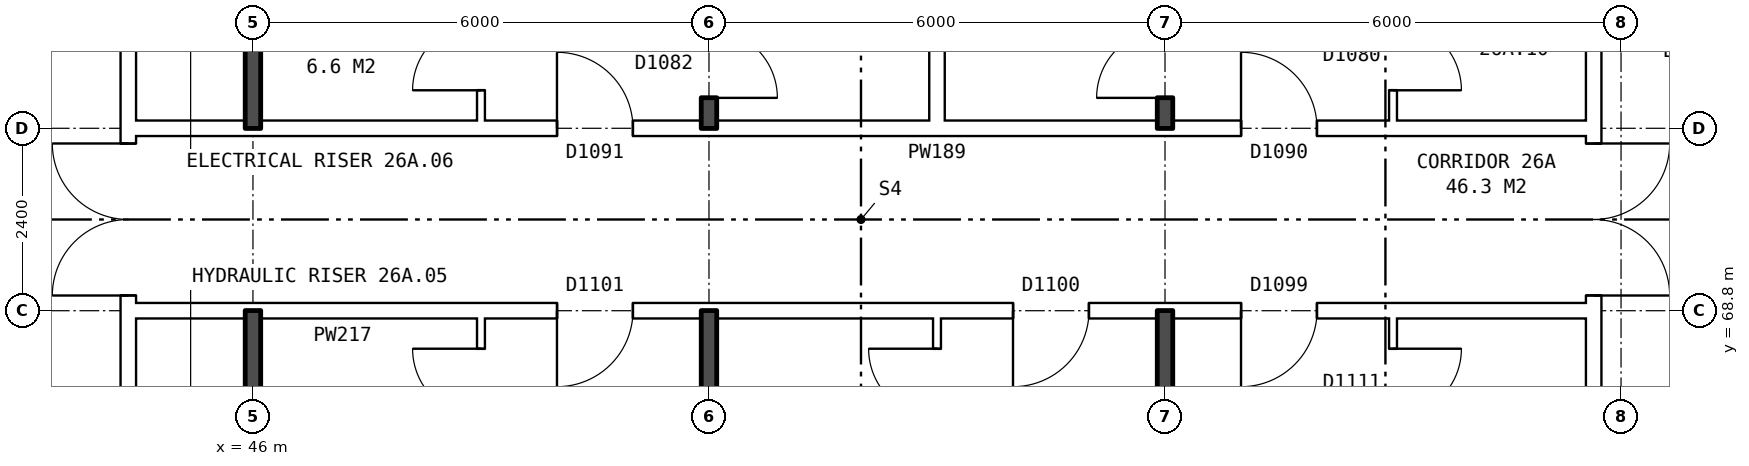
"""IFC4 building model, lengths in metres.
Left out: names, types, materials, properties, quantities, classifications, styles, units other than length and angle.
Written with IfcOpenShell. Run it as: python <this file> out.ifc"""

import sys

from ifc_helpers import new_model, si_unit, direction, frame, frame_2d, origin, place, context, subcontext, project, spatial, rectangle, extrude, element, fill, save


model = new_model("IFC4")
c1 = context("Model", 3, precision=1e-05, world=origin(), true_north=direction((0.0, 1.0)))
c2 = subcontext(c1, "Body", "Model", "MODEL_VIEW")
j1 = project(units=[si_unit("LENGTHUNIT", "METRE"), si_unit("PLANEANGLEUNIT", "RADIAN")], contexts=[c1])
p1 = place(None, origin())
s1 = spatial("IfcSite", under=j1, at=p1, CompositionType="ELEMENT")
p2 = place(p1, origin())
s2 = spatial("IfcBuilding", under=s1, at=p2, CompositionType="ELEMENT")
p3 = place(p2, frame((0.0, 0.0, 96.4)))
s3 = spatial("IfcBuildingStorey", under=s2, at=p3, CompositionType="ELEMENT", Elevation=96.4)
p4 = place(p3, frame((63.64, 63.9, 0.0), z_axis=(0.0, 0.0, 1.0), x_axis=(0.0, 1.0, 0.0)))
e1 = element("IfcWall", 1, at=p4, inside=s3, PredefinedType="PARTITIONING", context=c2, shape_type="SweptSolid", body=[
    extrude(rectangle(XDim=12.2, YDim=0.2, at=frame_2d((6.1, 0.0))), origin(), (0.0, 0.0, 1.0), 2.85),
])
p5 = place(p4, frame((5.1, 0.0, 0.0)))
e2 = element("IfcOpeningElement", 2, at=p5, cuts=e1, PredefinedType="OPENING", context=c2, shape_type="SweptSolid", body=[
    extrude(rectangle(XDim=2.0, YDim=2.1, at=frame_2d((1.0, 1.05))), frame((0.0, 0.11, 0.0), z_axis=(0.0, -1.0, 0.0), x_axis=(1.0, 0.0, 0.0)), (0.0, 0.0, 1.0), 0.22),
])
p6 = place(p3, frame((44.36, 63.9, 0.0), z_axis=(0.0, 0.0, 1.0), x_axis=(0.0, 1.0, 0.0)))
e3 = element("IfcWall", 3, at=p6, inside=s3, PredefinedType="PARTITIONING", context=c2, shape_type="SweptSolid", body=[
    extrude(rectangle(XDim=12.2, YDim=0.2, at=frame_2d((6.1, 0.0))), origin(), (0.0, 0.0, 1.0), 2.85),
])
p7 = place(p6, frame((5.1, 0.0, 0.0)))
e4 = element("IfcOpeningElement", 4, at=p7, cuts=e3, PredefinedType="OPENING", context=c2, shape_type="SweptSolid", body=[
    extrude(rectangle(XDim=2.0, YDim=2.1, at=frame_2d((1.0, 1.05))), frame((0.0, 0.11, 0.0), z_axis=(0.0, -1.0, 0.0), x_axis=(1.0, 0.0, 0.0)), (0.0, 0.0, 1.0), 0.22),
])
p8 = place(p3, frame((44.36, 68.8, 0.0), z_axis=(0.0, 0.0, 1.0), x_axis=(1.0, 0.0, 0.0)))
e5 = element("IfcWall", 5, at=p8, inside=s3, PredefinedType="PARTITIONING", context=c2, shape_type="SweptSolid", body=[
    extrude(rectangle(XDim=19.28, YDim=0.2, at=frame_2d((9.64, 0.0))), origin(), (0.0, 0.0, 1.0), 2.85),
])
p9 = place(p8, frame((14.64, 0.0, 0.0)))
e6 = element("IfcOpeningElement", 6, at=p9, cuts=e5, PredefinedType="OPENING", context=c2, shape_type="SweptSolid", body=[
    extrude(rectangle(XDim=1.0, YDim=2.1, at=frame_2d((0.5, 1.05))), frame((0.0, 0.11, 0.0), z_axis=(0.0, -1.0, 0.0), x_axis=(1.0, 0.0, 0.0)), (0.0, 0.0, 1.0), 0.22),
])
p10 = place(p8, frame((11.64, 0.0, 0.0)))
e7 = element("IfcOpeningElement", 7, at=p10, cuts=e5, PredefinedType="OPENING", context=c2, shape_type="SweptSolid", body=[
    extrude(rectangle(XDim=1.0, YDim=2.1, at=frame_2d((0.5, 1.05))), frame((0.0, 0.11, 0.0), z_axis=(0.0, -1.0, 0.0), x_axis=(1.0, 0.0, 0.0)), (0.0, 0.0, 1.0), 0.22),
])
p11 = place(p8, frame((5.64, 0.0, 0.0)))
e8 = element("IfcOpeningElement", 8, at=p11, cuts=e5, PredefinedType="OPENING", context=c2, shape_type="SweptSolid", body=[
    extrude(rectangle(XDim=1.0, YDim=2.1, at=frame_2d((0.5, 1.05))), frame((0.0, 0.11, 0.0), z_axis=(0.0, -1.0, 0.0), x_axis=(1.0, 0.0, 0.0)), (0.0, 0.0, 1.0), 0.22),
])
p12 = place(p3, frame((44.36, 71.2, 0.0), z_axis=(0.0, 0.0, 1.0), x_axis=(1.0, 0.0, 0.0)))
e9 = element("IfcWall", 9, at=p12, inside=s3, PredefinedType="PARTITIONING", context=c2, shape_type="SweptSolid", body=[
    extrude(rectangle(XDim=19.28, YDim=0.2, at=frame_2d((9.64, 0.0))), origin(), (0.0, 0.0, 1.0), 2.85),
])
p13 = place(p12, frame((14.64, 0.0, 0.0)))
e10 = element("IfcOpeningElement", 10, at=p13, cuts=e9, PredefinedType="OPENING", context=c2, shape_type="SweptSolid", body=[
    extrude(rectangle(XDim=1.0, YDim=2.1, at=frame_2d((0.5, 1.05))), frame((0.0, 0.11, 0.0), z_axis=(0.0, -1.0, 0.0), x_axis=(1.0, 0.0, 0.0)), (0.0, 0.0, 1.0), 0.22),
])
p14 = place(p12, frame((5.64, 0.0, 0.0)))
e11 = element("IfcOpeningElement", 11, at=p14, cuts=e9, PredefinedType="OPENING", context=c2, shape_type="SweptSolid", body=[
    extrude(rectangle(XDim=1.0, YDim=2.1, at=frame_2d((0.5, 1.05))), frame((0.0, 0.11, 0.0), z_axis=(0.0, -1.0, 0.0), x_axis=(1.0, 0.0, 0.0)), (0.0, 0.0, 1.0), 0.22),
])
for number, where, z_axis, x_axis in (
    (12, (46.0, 63.8, 0.0), (0.0, 0.0, 1.0), (0.0, 1.0, 0.0)),
    (13, (46.0, 71.2, 0.0), (0.0, 0.0, 1.0), (0.0, 1.0, 0.0)),
):
    element("IfcWall", number, at=place(p3, frame(where, z_axis=z_axis, x_axis=x_axis)), inside=s3, PredefinedType="SOLIDWALL", context=c2, shape_type="SweptSolid", body=[
        extrude(rectangle(XDim=5.0, YDim=0.2, at=frame_2d((2.5, 0.0))), origin(), (0.0, 0.0, 1.0), 2.85),
    ])
p15 = place(p3, frame((49.0, 54.36, 0.0), z_axis=(0.0, 0.0, 1.0), x_axis=(0.0, 1.0, 0.0)))
e14 = element("IfcWall", 14, at=p15, inside=s3, PredefinedType="PARTITIONING", context=c2, shape_type="SweptSolid", body=[
    extrude(rectangle(XDim=14.34, YDim=0.1, at=frame_2d((7.17, 0.0))), origin(), (0.0, 0.0, 1.0), 2.85),
])
p16 = place(p15, frame((7.7, 0.0, 0.0)))
e15 = element("IfcOpeningElement", 15, at=p16, cuts=e14, PredefinedType="OPENING", context=c2, shape_type="SweptSolid", body=[
    extrude(rectangle(XDim=0.9, YDim=2.1, at=frame_2d((0.45, 1.05))), frame((0.0, 0.06, 0.0), z_axis=(0.0, -1.0, 0.0), x_axis=(1.0, 0.0, 0.0)), (0.0, 0.0, 1.0), 0.12),
])
p17 = place(p15, frame((13.04, 0.0, 0.0)))
e16 = element("IfcOpeningElement", 16, at=p17, cuts=e14, PredefinedType="OPENING", context=c2, shape_type="SweptSolid", body=[
    extrude(rectangle(XDim=0.9, YDim=2.1, at=frame_2d((0.45, 1.05))), frame((0.0, 0.06, 0.0), z_axis=(0.0, -1.0, 0.0), x_axis=(1.0, 0.0, 0.0)), (0.0, 0.0, 1.0), 0.12),
])
p18 = place(p3, frame((49.0, 71.3, 0.0), z_axis=(0.0, 0.0, 1.0), x_axis=(0.0, 1.0, 0.0)))
e17 = element("IfcWall", 17, at=p18, inside=s3, PredefinedType="PARTITIONING", context=c2, shape_type="SweptSolid", body=[
    extrude(rectangle(XDim=14.34, YDim=0.1, at=frame_2d((7.17, 0.0))), origin(), (0.0, 0.0, 1.0), 2.85),
])
p19 = place(p18, frame((7.94, 0.0, 0.0)))
e18 = element("IfcOpeningElement", 18, at=p19, cuts=e17, PredefinedType="OPENING", context=c2, shape_type="SweptSolid", body=[
    extrude(rectangle(XDim=0.9, YDim=2.1, at=frame_2d((0.45, 1.05))), frame((0.0, 0.06, 0.0), z_axis=(0.0, -1.0, 0.0), x_axis=(1.0, 0.0, 0.0)), (0.0, 0.0, 1.0), 0.12),
])
p20 = place(p18, frame((0.4, 0.0, 0.0)))
e19 = element("IfcOpeningElement", 19, at=p20, cuts=e17, PredefinedType="OPENING", context=c2, shape_type="SweptSolid", body=[
    extrude(rectangle(XDim=0.9, YDim=2.1, at=frame_2d((0.45, 1.05))), frame((0.0, 0.06, 0.0), z_axis=(0.0, -1.0, 0.0), x_axis=(1.0, 0.0, 0.0)), (0.0, 0.0, 1.0), 0.12),
])
p21 = place(p3, frame((52.0, 54.36, 0.0), z_axis=(0.0, 0.0, 1.0), x_axis=(0.0, 1.0, 0.0)))
e20 = element("IfcWall", 20, at=p21, inside=s3, PredefinedType="SOLIDWALL", context=c2, shape_type="SweptSolid", body=[
    extrude(rectangle(XDim=14.44, YDim=0.2, at=frame_2d((7.22, 0.0))), origin(), (0.0, 0.0, 1.0), 2.85),
])
p22 = place(p3, frame((52.0, 71.2, 0.0), z_axis=(0.0, 0.0, 1.0), x_axis=(0.0, 1.0, 0.0)))
e21 = element("IfcWall", 21, at=p22, inside=s3, PredefinedType="SOLIDWALL", context=c2, shape_type="SweptSolid", body=[
    extrude(rectangle(XDim=14.44, YDim=0.2, at=frame_2d((7.22, 0.0))), origin(), (0.0, 0.0, 1.0), 2.85),
])
p23 = place(p22, frame((8.04, 0.0, 0.0)))
e22 = element("IfcOpeningElement", 22, at=p23, cuts=e21, PredefinedType="OPENING", context=c2, shape_type="SweptSolid", body=[
    extrude(rectangle(XDim=0.9, YDim=2.1, at=frame_2d((0.45, 1.05))), frame((0.0, 0.11, 0.0), z_axis=(0.0, -1.0, 0.0), x_axis=(1.0, 0.0, 0.0)), (0.0, 0.0, 1.0), 0.22),
])
p24 = place(p22, frame((0.4, 0.0, 0.0)))
e23 = element("IfcOpeningElement", 23, at=p24, cuts=e21, PredefinedType="OPENING", context=c2, shape_type="SweptSolid", body=[
    extrude(rectangle(XDim=0.9, YDim=2.1, at=frame_2d((0.45, 1.05))), frame((0.0, 0.11, 0.0), z_axis=(0.0, -1.0, 0.0), x_axis=(1.0, 0.0, 0.0)), (0.0, 0.0, 1.0), 0.22),
])
p25 = place(p3, frame((55.0, 54.36, 0.0), z_axis=(0.0, 0.0, 1.0), x_axis=(0.0, 1.0, 0.0)))
e24 = element("IfcWall", 24, at=p25, inside=s3, PredefinedType="PARTITIONING", context=c2, shape_type="SweptSolid", body=[
    extrude(rectangle(XDim=14.34, YDim=0.1, at=frame_2d((7.17, 0.0))), origin(), (0.0, 0.0, 1.0), 2.85),
])
p26 = place(p25, frame((4.2, 0.0, 0.0)))
e25 = element("IfcOpeningElement", 25, at=p26, cuts=e24, PredefinedType="OPENING", context=c2, shape_type="SweptSolid", body=[
    extrude(rectangle(XDim=0.9, YDim=2.1, at=frame_2d((0.45, 1.05))), frame((0.0, 0.06, 0.0), z_axis=(0.0, -1.0, 0.0), x_axis=(1.0, 0.0, 0.0)), (0.0, 0.0, 1.0), 0.12),
])
p27 = place(p25, frame((13.04, 0.0, 0.0)))
e26 = element("IfcOpeningElement", 26, at=p27, cuts=e24, PredefinedType="OPENING", context=c2, shape_type="SweptSolid", body=[
    extrude(rectangle(XDim=0.9, YDim=2.1, at=frame_2d((0.45, 1.05))), frame((0.0, 0.06, 0.0), z_axis=(0.0, -1.0, 0.0), x_axis=(1.0, 0.0, 0.0)), (0.0, 0.0, 1.0), 0.12),
])
p28 = place(p3, frame((55.0, 71.3, 0.0), z_axis=(0.0, 0.0, 1.0), x_axis=(0.0, 1.0, 0.0)))
e27 = element("IfcWall", 27, at=p28, inside=s3, PredefinedType="PARTITIONING", context=c2, shape_type="SweptSolid", body=[
    extrude(rectangle(XDim=14.34, YDim=0.2, at=frame_2d((7.17, 0.0))), origin(), (0.0, 0.0, 1.0), 2.85),
])
p29 = place(p3, frame((58.0, 54.36, 0.0), z_axis=(0.0, 0.0, 1.0), x_axis=(0.0, 1.0, 0.0)))
e28 = element("IfcWall", 28, at=p29, inside=s3, PredefinedType="SOLIDWALL", context=c2, shape_type="SweptSolid", body=[
    extrude(rectangle(XDim=14.44, YDim=0.2, at=frame_2d((7.22, 0.0))), origin(), (0.0, 0.0, 1.0), 2.85),
])
p30 = place(p3, frame((58.0, 71.2, 0.0), z_axis=(0.0, 0.0, 1.0), x_axis=(0.0, 1.0, 0.0)))
e29 = element("IfcWall", 29, at=p30, inside=s3, PredefinedType="SOLIDWALL", context=c2, shape_type="SweptSolid", body=[
    extrude(rectangle(XDim=14.44, YDim=0.2, at=frame_2d((7.22, 0.0))), origin(), (0.0, 0.0, 1.0), 2.85),
])
p31 = place(p30, frame((9.34, 0.0, 0.0)))
e30 = element("IfcOpeningElement", 30, at=p31, cuts=e29, PredefinedType="OPENING", context=c2, shape_type="SweptSolid", body=[
    extrude(rectangle(XDim=0.9, YDim=2.1, at=frame_2d((0.45, 1.05))), frame((0.0, 0.11, 0.0), z_axis=(0.0, -1.0, 0.0), x_axis=(1.0, 0.0, 0.0)), (0.0, 0.0, 1.0), 0.22),
])
p32 = place(p30, frame((0.4, 0.0, 0.0)))
e31 = element("IfcOpeningElement", 31, at=p32, cuts=e29, PredefinedType="OPENING", context=c2, shape_type="SweptSolid", body=[
    extrude(rectangle(XDim=0.9, YDim=2.1, at=frame_2d((0.45, 1.05))), frame((0.0, 0.11, 0.0), z_axis=(0.0, -1.0, 0.0), x_axis=(1.0, 0.0, 0.0)), (0.0, 0.0, 1.0), 0.22),
])
p33 = place(p3, frame((61.0, 54.36, 0.0), z_axis=(0.0, 0.0, 1.0), x_axis=(0.0, 1.0, 0.0)))
e32 = element("IfcWall", 32, at=p33, inside=s3, PredefinedType="PARTITIONING", context=c2, shape_type="SweptSolid", body=[
    extrude(rectangle(XDim=14.34, YDim=0.1, at=frame_2d((7.17, 0.0))), origin(), (0.0, 0.0, 1.0), 2.85),
])
p34 = place(p33, frame((4.2, 0.0, 0.0)))
e33 = element("IfcOpeningElement", 33, at=p34, cuts=e32, PredefinedType="OPENING", context=c2, shape_type="SweptSolid", body=[
    extrude(rectangle(XDim=0.9, YDim=2.1, at=frame_2d((0.45, 1.05))), frame((0.0, 0.06, 0.0), z_axis=(0.0, -1.0, 0.0), x_axis=(1.0, 0.0, 0.0)), (0.0, 0.0, 1.0), 0.12),
])
p35 = place(p33, frame((13.04, 0.0, 0.0)))
e34 = element("IfcOpeningElement", 34, at=p35, cuts=e32, PredefinedType="OPENING", context=c2, shape_type="SweptSolid", body=[
    extrude(rectangle(XDim=0.9, YDim=2.1, at=frame_2d((0.45, 1.05))), frame((0.0, 0.06, 0.0), z_axis=(0.0, -1.0, 0.0), x_axis=(1.0, 0.0, 0.0)), (0.0, 0.0, 1.0), 0.12),
])
p36 = place(p3, frame((61.0, 71.3, 0.0), z_axis=(0.0, 0.0, 1.0), x_axis=(0.0, 1.0, 0.0)))
e35 = element("IfcWall", 35, at=p36, inside=s3, PredefinedType="PARTITIONING", context=c2, shape_type="SweptSolid", body=[
    extrude(rectangle(XDim=14.34, YDim=0.1, at=frame_2d((7.17, 0.0))), origin(), (0.0, 0.0, 1.0), 2.85),
])
p37 = place(p36, frame((9.24, 0.0, 0.0)))
e36 = element("IfcOpeningElement", 36, at=p37, cuts=e35, PredefinedType="OPENING", context=c2, shape_type="SweptSolid", body=[
    extrude(rectangle(XDim=0.9, YDim=2.1, at=frame_2d((0.45, 1.05))), frame((0.0, 0.06, 0.0), z_axis=(0.0, -1.0, 0.0), x_axis=(1.0, 0.0, 0.0)), (0.0, 0.0, 1.0), 0.12),
])
p38 = place(p36, frame((0.4, 0.0, 0.0)))
e37 = element("IfcOpeningElement", 37, at=p38, cuts=e35, PredefinedType="OPENING", context=c2, shape_type="SweptSolid", body=[
    extrude(rectangle(XDim=0.9, YDim=2.1, at=frame_2d((0.45, 1.05))), frame((0.0, 0.06, 0.0), z_axis=(0.0, -1.0, 0.0), x_axis=(1.0, 0.0, 0.0)), (0.0, 0.0, 1.0), 0.12),
])
p39 = place(p5, frame((2.0, 0.0, 0.0), z_axis=(0.0, 0.0, 1.0), x_axis=(-1.0, 0.0, 0.0)))
e38 = element("IfcDoor", 38, at=p39, inside=s3, OperationType="DOUBLE_DOOR_SINGLE_SWING", PredefinedType="DOOR", context=c2, shape_type="SweptSolid", body=[
    extrude(rectangle(XDim=2.0, YDim=2.1, at=frame_2d((1.0, 1.05))), frame((0.0, 0.025, 0.0), z_axis=(0.0, -1.0, 0.0), x_axis=(1.0, 0.0, 0.0)), (0.0, 0.0, 1.0), 0.05),
])
fill(e2, e38)
p40 = place(p7, origin())
e39 = element("IfcDoor", 39, at=p40, inside=s3, OperationType="DOUBLE_DOOR_SINGLE_SWING", PredefinedType="DOOR", context=c2, shape_type="SweptSolid", body=[
    extrude(rectangle(XDim=2.0, YDim=2.1, at=frame_2d((1.0, 1.05))), frame((0.0, 0.025, 0.0), z_axis=(0.0, -1.0, 0.0), x_axis=(1.0, 0.0, 0.0)), (0.0, 0.0, 1.0), 0.05),
])
fill(e4, e39)
p41 = place(p9, frame((1.0, 0.0, 0.0), z_axis=(0.0, 0.0, 1.0), x_axis=(-1.0, 0.0, 0.0)))
e40 = element("IfcDoor", 40, at=p41, inside=s3, OperationType="SINGLE_SWING_RIGHT", PredefinedType="DOOR", context=c2, shape_type="SweptSolid", body=[
    extrude(rectangle(XDim=1.0, YDim=2.1, at=frame_2d((0.5, 1.05))), frame((0.0, 0.025, 0.0), z_axis=(0.0, -1.0, 0.0), x_axis=(1.0, 0.0, 0.0)), (0.0, 0.0, 1.0), 0.05),
])
fill(e6, e40)
p42 = place(p35, frame((0.9, 0.0, 0.0), z_axis=(0.0, 0.0, 1.0), x_axis=(-1.0, 0.0, 0.0)))
e41 = element("IfcDoor", 41, at=p42, inside=s3, OperationType="SINGLE_SWING_LEFT", PredefinedType="DOOR", context=c2, shape_type="SweptSolid", body=[
    extrude(rectangle(XDim=0.9, YDim=2.1, at=frame_2d((0.45, 1.05))), frame((0.0, 0.025, 0.0), z_axis=(0.0, -1.0, 0.0), x_axis=(1.0, 0.0, 0.0)), (0.0, 0.0, 1.0), 0.05),
])
fill(e34, e41)
p43 = place(p10, frame((1.0, 0.0, 0.0), z_axis=(0.0, 0.0, 1.0), x_axis=(-1.0, 0.0, 0.0)))
e42 = element("IfcDoor", 42, at=p43, inside=s3, OperationType="SINGLE_SWING_RIGHT", PredefinedType="DOOR", context=c2, shape_type="SweptSolid", body=[
    extrude(rectangle(XDim=1.0, YDim=2.1, at=frame_2d((0.5, 1.05))), frame((0.0, 0.025, 0.0), z_axis=(0.0, -1.0, 0.0), x_axis=(1.0, 0.0, 0.0)), (0.0, 0.0, 1.0), 0.05),
])
fill(e7, e42)
p44 = place(p27, origin())
e43 = element("IfcDoor", 43, at=p44, inside=s3, OperationType="SINGLE_SWING_RIGHT", PredefinedType="DOOR", context=c2, shape_type="SweptSolid", body=[
    extrude(rectangle(XDim=0.9, YDim=2.1, at=frame_2d((0.45, 1.05))), frame((0.0, 0.025, 0.0), z_axis=(0.0, -1.0, 0.0), x_axis=(1.0, 0.0, 0.0)), (0.0, 0.0, 1.0), 0.05),
])
fill(e26, e43)
p45 = place(p11, frame((1.0, 0.0, 0.0), z_axis=(0.0, 0.0, 1.0), x_axis=(-1.0, 0.0, 0.0)))
e44 = element("IfcDoor", 44, at=p45, inside=s3, OperationType="SINGLE_SWING_RIGHT", PredefinedType="DOOR", context=c2, shape_type="SweptSolid", body=[
    extrude(rectangle(XDim=1.0, YDim=2.1, at=frame_2d((0.5, 1.05))), frame((0.0, 0.025, 0.0), z_axis=(0.0, -1.0, 0.0), x_axis=(1.0, 0.0, 0.0)), (0.0, 0.0, 1.0), 0.05),
])
fill(e8, e44)
p46 = place(p17, origin())
e45 = element("IfcDoor", 45, at=p46, inside=s3, OperationType="SINGLE_SWING_RIGHT", PredefinedType="DOOR", context=c2, shape_type="SweptSolid", body=[
    extrude(rectangle(XDim=0.9, YDim=2.1, at=frame_2d((0.45, 1.05))), frame((0.0, 0.025, 0.0), z_axis=(0.0, -1.0, 0.0), x_axis=(1.0, 0.0, 0.0)), (0.0, 0.0, 1.0), 0.05),
])
fill(e16, e45)
p47 = place(p13, origin())
e46 = element("IfcDoor", 46, at=p47, inside=s3, OperationType="SINGLE_SWING_LEFT", PredefinedType="DOOR", context=c2, shape_type="SweptSolid", body=[
    extrude(rectangle(XDim=1.0, YDim=2.1, at=frame_2d((0.5, 1.05))), frame((0.0, 0.025, 0.0), z_axis=(0.0, -1.0, 0.0), x_axis=(1.0, 0.0, 0.0)), (0.0, 0.0, 1.0), 0.05),
])
fill(e10, e46)
p48 = place(p38, frame((0.9, 0.0, 0.0), z_axis=(0.0, 0.0, 1.0), x_axis=(-1.0, 0.0, 0.0)))
e47 = element("IfcDoor", 47, at=p48, inside=s3, OperationType="SINGLE_SWING_RIGHT", PredefinedType="DOOR", context=c2, shape_type="SweptSolid", body=[
    extrude(rectangle(XDim=0.9, YDim=2.1, at=frame_2d((0.45, 1.05))), frame((0.0, 0.025, 0.0), z_axis=(0.0, -1.0, 0.0), x_axis=(1.0, 0.0, 0.0)), (0.0, 0.0, 1.0), 0.05),
])
fill(e37, e47)
p49 = place(p32, origin())
e48 = element("IfcDoor", 48, at=p49, inside=s3, OperationType="SINGLE_SWING_LEFT", PredefinedType="DOOR", context=c2, shape_type="SweptSolid", body=[
    extrude(rectangle(XDim=0.9, YDim=2.1, at=frame_2d((0.45, 1.05))), frame((0.0, 0.025, 0.0), z_axis=(0.0, -1.0, 0.0), x_axis=(1.0, 0.0, 0.0)), (0.0, 0.0, 1.0), 0.05),
])
fill(e31, e48)
p50 = place(p14, origin())
e49 = element("IfcDoor", 49, at=p50, inside=s3, OperationType="SINGLE_SWING_LEFT", PredefinedType="DOOR", context=c2, shape_type="SweptSolid", body=[
    extrude(rectangle(XDim=1.0, YDim=2.1, at=frame_2d((0.5, 1.05))), frame((0.0, 0.025, 0.0), z_axis=(0.0, -1.0, 0.0), x_axis=(1.0, 0.0, 0.0)), (0.0, 0.0, 1.0), 0.05),
])
fill(e11, e49)
p51 = place(p24, frame((0.9, 0.0, 0.0), z_axis=(0.0, 0.0, 1.0), x_axis=(-1.0, 0.0, 0.0)))
e50 = element("IfcDoor", 50, at=p51, inside=s3, OperationType="SINGLE_SWING_RIGHT", PredefinedType="DOOR", context=c2, shape_type="SweptSolid", body=[
    extrude(rectangle(XDim=0.9, YDim=2.1, at=frame_2d((0.45, 1.05))), frame((0.0, 0.025, 0.0), z_axis=(0.0, -1.0, 0.0), x_axis=(1.0, 0.0, 0.0)), (0.0, 0.0, 1.0), 0.05),
])
fill(e23, e50)
p52 = place(p20, origin())
e51 = element("IfcDoor", 51, at=p52, inside=s3, OperationType="SINGLE_SWING_LEFT", PredefinedType="DOOR", context=c2, shape_type="SweptSolid", body=[
    extrude(rectangle(XDim=0.9, YDim=2.1, at=frame_2d((0.45, 1.05))), frame((0.0, 0.025, 0.0), z_axis=(0.0, -1.0, 0.0), x_axis=(1.0, 0.0, 0.0)), (0.0, 0.0, 1.0), 0.05),
])
fill(e19, e51)
save(model, sys.argv[1])
